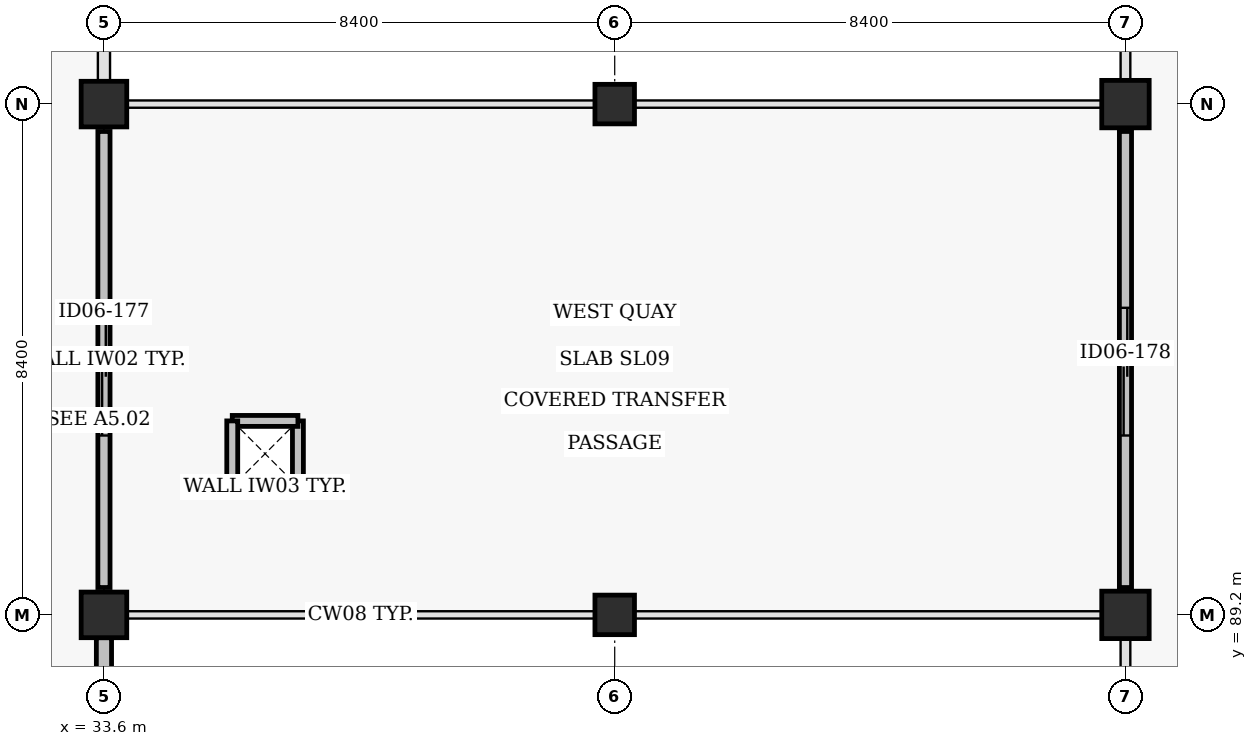
"""IFC4 building model, lengths in metres.
Left out: names, types, materials, properties, quantities, classifications, styles, units other than length and angle.
Written with IfcOpenShell. Run it as: python <this file> out.ifc"""

import sys

from ifc_helpers import new_model, si_unit, direction, frame, frame_2d, origin, origin_2d, place, context, subcontext, project, spatial, rectangle, circle, extrude, element, fill, save


model = new_model("IFC4")
c1 = context("Model", 3, precision=1e-05, world=origin(), true_north=direction((0.0, 1.0)))
c2 = subcontext(c1, "Body", "Model", "MODEL_VIEW")
j1 = project(units=[si_unit("LENGTHUNIT", "METRE"), si_unit("PLANEANGLEUNIT", "RADIAN")], contexts=[c1])
p1 = place(None, origin())
s1 = spatial("IfcSite", under=j1, at=p1, CompositionType="ELEMENT")
p2 = place(p1, origin())
s2 = spatial("IfcBuilding", under=s1, at=p2, CompositionType="ELEMENT")
p3 = place(p2, frame((0.0, 0.0, 5.44)))
s3 = spatial("IfcBuildingStorey", under=s2, at=p3, CompositionType="ELEMENT", Elevation=5.44)
for number, where, z_axis, x_axis in (
    (1, (42.0, 89.2, 0.0), (0.0, 0.0, 1.0), (1.0, 0.0, 0.0)),
    (2, (42.0, 97.6, 0.0), (0.0, 0.0, 1.0), (1.0, 0.0, 0.0)),
):
    element("IfcColumn", number, at=place(p3, frame(where, z_axis=z_axis, x_axis=x_axis)), inside=s3, PredefinedType="COLUMN", context=c2, shape_type="SweptSolid", body=[
        extrude(circle(Radius=0.325, at=origin_2d()), origin(), (0.0, 0.0, 1.0), 4.16),
    ])
for number, where, z_axis, x_axis in (
    (3, (33.6, 89.2, 0.0), (0.0, 0.0, 1.0), (1.0, 0.0, 0.0)),
    (4, (33.6, 97.6, 0.0), (0.0, 0.0, 1.0), (1.0, 0.0, 0.0)),
):
    element("IfcColumn", number, at=place(p3, frame(where, z_axis=z_axis, x_axis=x_axis)), inside=s3, PredefinedType="COLUMN", context=c2, shape_type="SweptSolid", body=[
        extrude(rectangle(XDim=0.75, YDim=0.75, at=origin_2d()), origin(), (0.0, 0.0, 1.0), 4.16),
    ])
for number, where, z_axis, x_axis in (
    (5, (50.4, 89.2, 0.0), (0.0, 0.0, 1.0), (1.0, 0.0, 0.0)),
    (6, (50.4, 97.6, 0.0), (0.0, 0.0, 1.0), (1.0, 0.0, 0.0)),
):
    element("IfcColumn", number, at=place(p3, frame(where, z_axis=z_axis, x_axis=x_axis)), inside=s3, PredefinedType="COLUMN", context=c2, shape_type="SweptSolid", body=[
        extrude(circle(Radius=0.39, at=origin_2d()), origin(), (0.0, 0.0, 1.0), 4.16),
    ])
p4 = place(p3, frame((33.6, 81.175, 0.0), z_axis=(0.0, 0.0, 1.0), x_axis=(0.0, 1.0, 0.0)))
e7 = element("IfcWall", 7, at=p4, inside=s3, PredefinedType="SOLIDWALL", context=c2, shape_type="SweptSolid", body=[
    extrude(rectangle(XDim=7.65, YDim=0.25, at=frame_2d((3.825, 0.0))), origin(), (0.0, 0.0, 1.0), 3.515),
])
p5 = place(p3, frame((35.71, 91.31, 0.0), z_axis=(0.0, 0.0, 1.0), x_axis=(1.0, 0.0, 0.0)))
e8 = element("IfcWall", 8, at=p5, inside=s3, PredefinedType="SOLIDWALL", context=c2, shape_type="SweptSolid", body=[
    extrude(rectangle(XDim=1.08, YDim=0.18, at=frame_2d((0.54, 0.0))), origin(), (0.0, 0.0, 1.0), 2.6),
])
p6 = place(p3, frame((36.79, 91.31, 0.0), z_axis=(0.0, 0.0, 1.0), x_axis=(0.0, 1.0, 0.0)))
e9 = element("IfcWall", 9, at=p6, inside=s3, PredefinedType="SOLIDWALL", context=c2, shape_type="SweptSolid", body=[
    extrude(rectangle(XDim=1.08, YDim=0.18, at=frame_2d((0.54, 0.0))), origin(), (0.0, 0.0, 1.0), 2.6),
])
p7 = place(p3, frame((36.79, 92.39, 0.0), z_axis=(0.0, 0.0, 1.0), x_axis=(-1.0, 0.0, 0.0)))
e10 = element("IfcWall", 10, at=p7, inside=s3, PredefinedType="SOLIDWALL", context=c2, shape_type="SweptSolid", body=[
    extrude(rectangle(XDim=1.08, YDim=0.18, at=frame_2d((0.54, 0.0))), origin(), (0.0, 0.0, 1.0), 2.6),
])
p8 = place(p3, frame((35.71, 92.39, 0.0), z_axis=(0.0, 0.0, 1.0), x_axis=(0.0, -1.0, 0.0)))
e11 = element("IfcWall", 11, at=p8, inside=s3, PredefinedType="SOLIDWALL", context=c2, shape_type="SweptSolid", body=[
    extrude(rectangle(XDim=1.08, YDim=0.18, at=frame_2d((0.54, 0.0))), origin(), (0.0, 0.0, 1.0), 2.6),
])
p9 = place(p3, frame((33.6, 89.65, 0.0), z_axis=(0.0, 0.0, 1.0), x_axis=(0.0, 1.0, 0.0)))
e12 = element("IfcWall", 12, at=p9, inside=s3, PredefinedType="SOLIDWALL", context=c2, shape_type="SweptSolid", body=[
    extrude(rectangle(XDim=7.5, YDim=0.2, at=frame_2d((3.75, 0.0))), origin(), (0.0, 0.0, 1.0), 3.515),
])
p10 = place(p9, frame((2.5, 0.0, 0.0)))
e13 = element("IfcOpeningElement", 13, at=p10, cuts=e12, PredefinedType="OPENING", context=c2, shape_type="SweptSolid", body=[
    extrude(rectangle(XDim=2.1, YDim=2.22, at=frame_2d((1.05, 1.11))), frame((0.0, 0.11, 0.0), z_axis=(0.0, -1.0, 0.0), x_axis=(1.0, 0.0, 0.0)), (0.0, 0.0, 1.0), 0.22),
])
p11 = place(p3, frame((50.4, 89.65, 0.0), z_axis=(0.0, 0.0, 1.0), x_axis=(0.0, 1.0, 0.0)))
e14 = element("IfcWall", 14, at=p11, inside=s3, PredefinedType="SOLIDWALL", context=c2, shape_type="SweptSolid", body=[
    extrude(rectangle(XDim=7.5, YDim=0.2, at=frame_2d((3.75, 0.0))), origin(), (0.0, 0.0, 1.0), 3.665),
])
p12 = place(p11, frame((2.5, 0.0, 0.0)))
e15 = element("IfcOpeningElement", 15, at=p12, cuts=e14, PredefinedType="OPENING", context=c2, shape_type="SweptSolid", body=[
    extrude(rectangle(XDim=2.1, YDim=2.22, at=frame_2d((1.05, 1.11))), frame((0.0, 0.11, 0.0), z_axis=(0.0, -1.0, 0.0), x_axis=(1.0, 0.0, 0.0)), (0.0, 0.0, 1.0), 0.22),
])
p13 = place(p10, origin())
e16 = element("IfcDoor", 16, at=p13, inside=s3, OperationType="DOUBLE_DOOR_SLIDING", PredefinedType="DOOR", context=c2, shape_type="SweptSolid", body=[
    extrude(rectangle(XDim=2.1, YDim=2.22, at=frame_2d((1.05, 1.11))), frame((0.0, 0.025, 0.0), z_axis=(0.0, -1.0, 0.0), x_axis=(1.0, 0.0, 0.0)), (0.0, 0.0, 1.0), 0.05),
])
fill(e13, e16)
p14 = place(p12, origin())
e17 = element("IfcDoor", 17, at=p14, inside=s3, OperationType="DOUBLE_DOOR_SLIDING", PredefinedType="DOOR", context=c2, shape_type="SweptSolid", body=[
    extrude(rectangle(XDim=2.1, YDim=2.22, at=frame_2d((1.05, 1.11))), frame((0.0, 0.025, 0.0), z_axis=(0.0, -1.0, 0.0), x_axis=(1.0, 0.0, 0.0)), (0.0, 0.0, 1.0), 0.05),
])
fill(e15, e17)
save(model, sys.argv[1])
